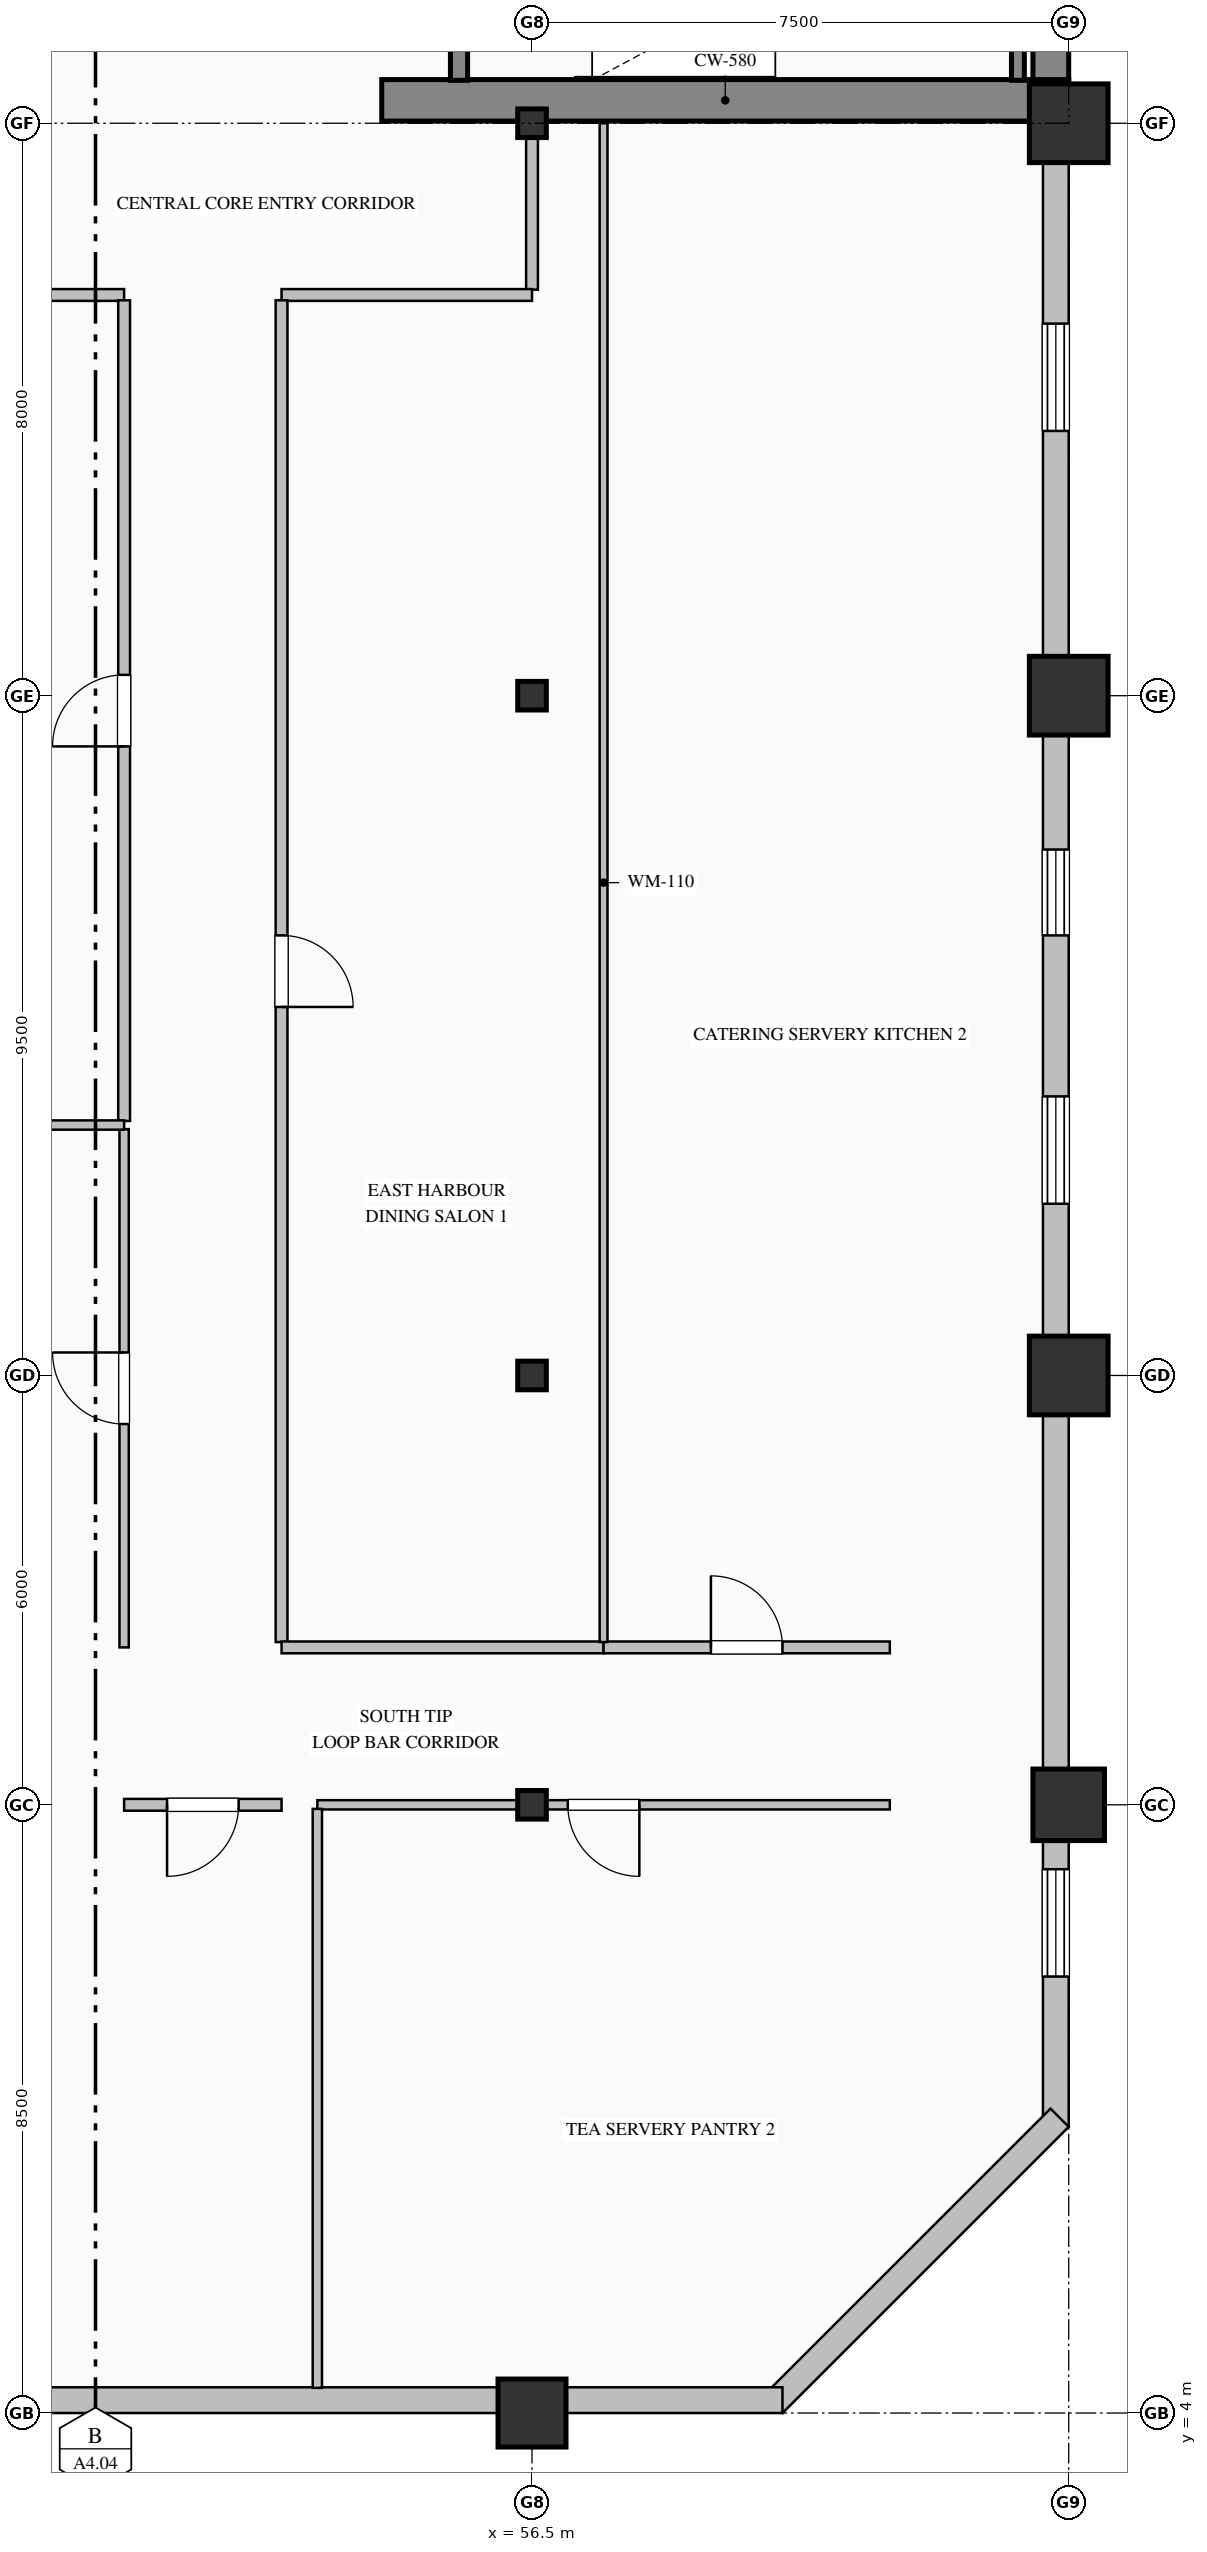
"""IFC4 building model, lengths in metres.
Left out: names, types, materials, properties, quantities, classifications, styles, units other than length and angle.
Written with IfcOpenShell. Run it as: python <this file> out.ifc"""

import sys

from ifc_helpers import new_model, si_unit, direction, frame, frame_2d, origin, origin_2d, place, context, subcontext, project, spatial, rectangle, hollow_rectangle, hollow_circle, i_section, extrude, element, fill, save


model = new_model("IFC4")
c1 = context("Model", 3, precision=1e-05, world=origin(), true_north=direction((0.0, 1.0)))
c2 = subcontext(c1, "Body", "Model", "MODEL_VIEW")
j1 = project(units=[si_unit("LENGTHUNIT", "METRE"), si_unit("PLANEANGLEUNIT", "RADIAN")], contexts=[c1])
p1 = place(None, origin())
s1 = spatial("IfcSite", under=j1, at=p1, CompositionType="ELEMENT")
p2 = place(p1, origin())
s2 = spatial("IfcBuilding", under=s1, at=p2, CompositionType="ELEMENT")
p3 = place(p2, frame((0.0, 0.0, 163.0)))
s3 = spatial("IfcBuildingStorey", under=s2, at=p3, CompositionType="ELEMENT", Elevation=163.0)
p4 = place(p3, frame((63.75, 36.32, 0.0), z_axis=(0.0, 0.0, 1.0), x_axis=(0.0, 1.0, 0.0)))
e1 = element("IfcWall", 1, at=p4, inside=s3, PredefinedType="SHEAR", context=c2, shape_type="SweptSolid", body=[
    extrude(rectangle(XDim=15.18, YDim=0.5, at=frame_2d((7.59, 0.0))), origin(), (0.0, 0.0, 1.0), 3.765),
])
p5 = place(p3, frame((54.4, 36.32, 0.0), z_axis=(0.0, 0.0, 1.0), x_axis=(1.0, 0.0, 0.0)))
e2 = element("IfcWall", 2, at=p5, inside=s3, PredefinedType="SHEAR", context=c2, shape_type="SweptSolid", body=[
    extrude(rectangle(XDim=9.6, YDim=0.58, at=frame_2d((4.8, 0.0))), origin(), (0.0, 0.0, 1.0), 4.0),
])
p6 = place(p3, frame((56.5, 4.0, 0.0), z_axis=(0.0, 0.0, 1.0), x_axis=(1.0, 0.0, 0.0)))
e3 = element("IfcColumn", 3, at=p6, inside=s3, PredefinedType="COLUMN", context=c2, shape_type="SweptSolid", body=[
    extrude(hollow_rectangle(XDim=0.95, YDim=0.95, WallThickness=0.036, at=origin_2d()), origin(), (0.0, 0.0, 1.0), 4.0),
])
for number, where, z_axis, x_axis in (
    (4, (56.5, 12.5, 0.0), (0.0, 0.0, 1.0), (1.0, 0.0, 0.0)),
    (5, (56.5, 18.5, 0.0), (0.0, 0.0, 1.0), (1.0, 0.0, 0.0)),
    (6, (56.5, 28.0, 0.0), (0.0, 0.0, 1.0), (1.0, 0.0, 0.0)),
    (7, (56.5, 36.0, 0.0), (0.0, 0.0, 1.0), (1.0, 0.0, 0.0)),
):
    element("IfcColumn", number, at=place(p3, frame(where, z_axis=z_axis, x_axis=x_axis)), inside=s3, PredefinedType="COLUMN", context=c2, shape_type="SweptSolid", body=[
        extrude(i_section(OverallWidth=0.4, OverallDepth=0.4, WebThickness=0.013, FlangeThickness=0.021, FilletRadius=0.022, at=origin_2d()), origin(), (0.0, 0.0, 1.0), 4.0),
    ])
p7 = place(p3, frame((64.0, 12.5, 0.0), z_axis=(0.0, 0.0, 1.0), x_axis=(1.0, 0.0, 0.0)))
e8 = element("IfcColumn", 8, at=p7, inside=s3, PredefinedType="COLUMN", context=c2, shape_type="SweptSolid", body=[
    extrude(hollow_circle(Radius=0.5, WallThickness=0.036, at=origin_2d()), origin(), (0.0, 0.0, 1.0), 4.0),
])
for number, where, z_axis, x_axis in (
    (9, (64.0, 18.5, 0.0), (0.0, 0.0, 1.0), (1.0, 0.0, 0.0)),
    (10, (64.0, 28.0, 0.0), (0.0, 0.0, 1.0), (1.0, 0.0, 0.0)),
    (11, (64.0, 36.0, 0.0), (0.0, 0.0, 1.0), (1.0, 0.0, 0.0)),
):
    element("IfcColumn", number, at=place(p3, frame(where, z_axis=z_axis, x_axis=x_axis)), inside=s3, PredefinedType="COLUMN", context=c2, shape_type="SweptSolid", body=[
        extrude(hollow_rectangle(XDim=1.1, YDim=1.1, WallThickness=0.04, at=origin_2d()), origin(), (0.0, 0.0, 1.0), 4.0),
    ])
p8 = place(p3, frame((63.82, 36.05, 0.0), z_axis=(0.0, 0.0, 1.0), x_axis=(0.0, -1.0, 0.0)))
e12 = element("IfcWall", 12, at=p8, inside=s3, PredefinedType="SOLIDWALL", context=c2, shape_type="SweptSolid", body=[
    extrude(rectangle(XDim=28.05, YDim=0.36, at=frame_2d((14.025, 0.0))), origin(), (0.0, 0.0, 1.0), 3.265),
])
p9 = place(p8, frame((2.85, 0.0, 0.85)))
e13 = element("IfcOpeningElement", 13, at=p9, cuts=e12, PredefinedType="OPENING", context=c2, shape_type="SweptSolid", body=[
    extrude(rectangle(XDim=1.5, YDim=1.95, at=frame_2d((0.75, 0.975))), frame((0.0, 0.19, 0.0), z_axis=(0.0, -1.0, 0.0), x_axis=(1.0, 0.0, 0.0)), (0.0, 0.0, 1.0), 0.38),
])
p10 = place(p8, frame((10.2, 0.0, 0.7)))
e14 = element("IfcOpeningElement", 14, at=p10, cuts=e12, PredefinedType="OPENING", context=c2, shape_type="SweptSolid", body=[
    extrude(rectangle(XDim=1.2, YDim=1.85, at=frame_2d((0.6, 0.925))), frame((0.0, 0.19, 0.0), z_axis=(0.0, -1.0, 0.0), x_axis=(1.0, 0.0, 0.0)), (0.0, 0.0, 1.0), 0.38),
])
p11 = place(p8, frame((13.65, 0.0, 0.85)))
e15 = element("IfcOpeningElement", 15, at=p11, cuts=e12, PredefinedType="OPENING", context=c2, shape_type="SweptSolid", body=[
    extrude(rectangle(XDim=1.5, YDim=1.95, at=frame_2d((0.75, 0.975))), frame((0.0, 0.19, 0.0), z_axis=(0.0, -1.0, 0.0), x_axis=(1.0, 0.0, 0.0)), (0.0, 0.0, 1.0), 0.38),
])
p12 = place(p8, frame((24.45, 0.0, 0.85)))
e16 = element("IfcOpeningElement", 16, at=p12, cuts=e12, PredefinedType="OPENING", context=c2, shape_type="SweptSolid", body=[
    extrude(rectangle(XDim=1.5, YDim=1.95, at=frame_2d((0.75, 0.975))), frame((0.0, 0.19, 0.0), z_axis=(0.0, -1.0, 0.0), x_axis=(1.0, 0.0, 0.0)), (0.0, 0.0, 1.0), 0.38),
])
p13 = place(p3, frame((63.873, 8.127, 0.0), z_axis=(0.0, 0.0, 1.0), x_axis=(-0.707106781187, -0.707106781187, 0.0)))
e17 = element("IfcWall", 17, at=p13, inside=s3, PredefinedType="SOLIDWALL", context=c2, shape_type="SweptSolid", body=[
    extrude(rectangle(XDim=5.657, YDim=0.36, at=frame_2d((2.828, 0.0))), origin(), (0.0, 0.0, 1.0), 3.765),
])
p14 = place(p3, frame((60.0, 4.18, 0.0), z_axis=(0.0, 0.0, 1.0), x_axis=(-1.0, 0.0, 0.0)))
e18 = element("IfcWall", 18, at=p14, inside=s3, PredefinedType="SOLIDWALL", context=c2, shape_type="SweptSolid", body=[
    extrude(rectangle(XDim=15.5, YDim=0.36, at=frame_2d((7.75, 0.0))), origin(), (0.0, 0.0, 1.0), 3.265),
])
p15 = place(p3, frame((55.48, 39.75, 0.0), z_axis=(0.0, 0.0, 1.0), x_axis=(0.0, -1.0, 0.0)))
e19 = element("IfcWall", 19, at=p15, inside=s3, PredefinedType="SOLIDWALL", context=c2, shape_type="SweptSolid", body=[
    extrude(rectangle(XDim=3.15, YDim=0.24, at=frame_2d((1.575, 0.0))), origin(), (0.0, 0.0, 1.0), 4.0),
])
p16 = place(p15, frame((1.0, 0.0, 0.0)))
e20 = element("IfcOpeningElement", 20, at=p16, cuts=e19, PredefinedType="OPENING", context=c2, shape_type="SweptSolid", body=[
    extrude(rectangle(XDim=1.15, YDim=2.2, at=frame_2d((0.575, 1.1))), frame((0.0, 0.13, 0.0), z_axis=(0.0, -1.0, 0.0), x_axis=(1.0, 0.0, 0.0)), (0.0, 0.0, 1.0), 0.26),
])
p17 = place(p3, frame((63.29, 36.6, 0.0), z_axis=(0.0, 0.0, 1.0), x_axis=(0.0, 1.0, 0.0)))
e21 = element("IfcWall", 21, at=p17, inside=s3, PredefinedType="SOLIDWALL", context=c2, shape_type="SweptSolid", body=[
    extrude(rectangle(XDim=3.15, YDim=0.18, at=frame_2d((1.575, 0.0))), origin(), (0.0, 0.0, 1.0), 4.0),
])
p18 = place(p3, frame((56.5, 36.0, 0.0), z_axis=(0.0, 0.0, 1.0), x_axis=(0.0, -1.0, 0.0)))
e22 = element("IfcWall", 22, at=p18, inside=s3, PredefinedType="PARTITIONING", context=c2, shape_type="SweptSolid", body=[
    extrude(rectangle(XDim=2.325, YDim=0.165, at=frame_2d((1.163, 0.0))), origin(), (0.0, 0.0, 1.0), 3.157),
])
p19 = place(p3, frame((56.5, 33.6, 0.0), z_axis=(0.0, 0.0, 1.0), x_axis=(-1.0, 0.0, 0.0)))
e23 = element("IfcWall", 23, at=p19, inside=s3, PredefinedType="PARTITIONING", context=c2, shape_type="SweptSolid", body=[
    extrude(rectangle(XDim=3.5, YDim=0.165, at=frame_2d((1.75, 0.0))), origin(), (0.0, 0.0, 1.0), 3.765),
])
p20 = place(p3, frame((50.8, 33.6, 0.0), z_axis=(0.0, 0.0, 1.0), x_axis=(-1.0, 0.0, 0.0)))
e24 = element("IfcWall", 24, at=p20, inside=s3, PredefinedType="PARTITIONING", context=c2, shape_type="SweptSolid", body=[
    extrude(rectangle(XDim=10.3, YDim=0.165, at=frame_2d((5.15, 0.0))), origin(), (0.0, 0.0, 1.0), 3.765),
])
p21 = place(p3, frame((53.0, 33.525, 0.0), z_axis=(0.0, 0.0, 1.0), x_axis=(0.0, -1.0, 0.0)))
e25 = element("IfcWall", 25, at=p21, inside=s3, PredefinedType="PARTITIONING", context=c2, shape_type="SweptSolid", body=[
    extrude(rectangle(XDim=18.751, YDim=0.165, at=frame_2d((9.375, 0.0))), origin(), (0.0, 0.0, 1.0), 3.765),
])
p22 = place(p21, frame((8.875, 0.0, 0.0)))
e26 = element("IfcOpeningElement", 26, at=p22, cuts=e25, PredefinedType="OPENING", context=c2, shape_type="SweptSolid", body=[
    extrude(rectangle(XDim=1.0, YDim=2.15, at=frame_2d((0.5, 1.075))), frame((0.0, 0.093, 0.0), z_axis=(0.0, -1.0, 0.0), x_axis=(1.0, 0.0, 0.0)), (0.0, 0.0, 1.0), 0.185),
])
p23 = place(p3, frame((50.8, 14.7, 0.0), z_axis=(0.0, 0.0, 1.0), x_axis=(0.0, 1.0, 0.0)))
e27 = element("IfcWall", 27, at=p23, inside=s3, PredefinedType="PARTITIONING", context=c2, shape_type="SweptSolid", body=[
    extrude(rectangle(XDim=7.243, YDim=0.13, at=frame_2d((3.622, 0.0))), origin(), (0.0, 0.0, 1.0), 3.765),
])
p24 = place(p23, frame((3.122, 0.0, 0.0)))
e28 = element("IfcOpeningElement", 28, at=p24, cuts=e27, PredefinedType="OPENING", context=c2, shape_type="SweptSolid", body=[
    extrude(rectangle(XDim=1.0, YDim=2.15, at=frame_2d((0.5, 1.075))), frame((0.0, 0.075, 0.0), z_axis=(0.0, -1.0, 0.0), x_axis=(1.0, 0.0, 0.0)), (0.0, 0.0, 1.0), 0.15),
])
p25 = place(p3, frame((50.8, 22.057, 0.0), z_axis=(0.0, 0.0, 1.0), x_axis=(0.0, 1.0, 0.0)))
e29 = element("IfcWall", 29, at=p25, inside=s3, PredefinedType="PARTITIONING", context=c2, shape_type="SweptSolid", body=[
    extrude(rectangle(XDim=11.469, YDim=0.165, at=frame_2d((5.734, 0.0))), origin(), (0.0, 0.0, 1.0), 3.765),
])
p26 = place(p25, frame((5.234, 0.0, 0.0)))
e30 = element("IfcOpeningElement", 30, at=p26, cuts=e29, PredefinedType="OPENING", context=c2, shape_type="SweptSolid", body=[
    extrude(rectangle(XDim=1.0, YDim=2.15, at=frame_2d((0.5, 1.075))), frame((0.0, 0.093, 0.0), z_axis=(0.0, -1.0, 0.0), x_axis=(1.0, 0.0, 0.0)), (0.0, 0.0, 1.0), 0.185),
])
p27 = place(p3, frame((53.0, 12.5, 0.0), z_axis=(0.0, 0.0, 1.0), x_axis=(-1.0, 0.0, 0.0)))
e31 = element("IfcWall", 31, at=p27, inside=s3, PredefinedType="PARTITIONING", context=c2, shape_type="SweptSolid", body=[
    extrude(rectangle(XDim=2.2, YDim=0.165, at=frame_2d((1.1, 0.0))), origin(), (0.0, 0.0, 1.0), 3.157),
])
p28 = place(p27, frame((0.6, 0.0, 0.0)))
e32 = element("IfcOpeningElement", 32, at=p28, cuts=e31, PredefinedType="OPENING", context=c2, shape_type="SweptSolid", body=[
    extrude(rectangle(XDim=1.0, YDim=2.15, at=frame_2d((0.5, 1.075))), frame((0.0, 0.093, 0.0), z_axis=(0.0, -1.0, 0.0), x_axis=(1.0, 0.0, 0.0)), (0.0, 0.0, 1.0), 0.185),
])
p29 = place(p3, frame((53.0, 14.7, 0.0), z_axis=(0.0, 0.0, 1.0), x_axis=(1.0, 0.0, 0.0)))
e33 = element("IfcWall", 33, at=p29, inside=s3, PredefinedType="PARTITIONING", context=c2, shape_type="SweptSolid", body=[
    extrude(rectangle(XDim=4.5, YDim=0.165, at=frame_2d((2.25, 0.0))), origin(), (0.0, 0.0, 1.0), 3.765),
])
p30 = place(p3, frame((57.5, 14.7, 0.0), z_axis=(0.0, 0.0, 1.0), x_axis=(1.0, 0.0, 0.0)))
e34 = element("IfcWall", 34, at=p30, inside=s3, PredefinedType="PARTITIONING", context=c2, shape_type="SweptSolid", body=[
    extrude(rectangle(XDim=4.0, YDim=0.165, at=frame_2d((2.0, 0.0))), origin(), (0.0, 0.0, 1.0), 3.765),
])
p31 = place(p30, frame((1.5, 0.0, 0.0)))
e35 = element("IfcOpeningElement", 35, at=p31, cuts=e34, PredefinedType="OPENING", context=c2, shape_type="SweptSolid", body=[
    extrude(rectangle(XDim=1.0, YDim=2.15, at=frame_2d((0.5, 1.075))), frame((0.0, 0.093, 0.0), z_axis=(0.0, -1.0, 0.0), x_axis=(1.0, 0.0, 0.0)), (0.0, 0.0, 1.0), 0.185),
])
p32 = place(p3, frame((61.5, 12.5, 0.0), z_axis=(0.0, 0.0, 1.0), x_axis=(-1.0, 0.0, 0.0)))
e36 = element("IfcWall", 36, at=p32, inside=s3, PredefinedType="PARTITIONING", context=c2, shape_type="SweptSolid", body=[
    extrude(rectangle(XDim=8.0, YDim=0.13, at=frame_2d((4.0, 0.0))), origin(), (0.0, 0.0, 1.0), 3.157),
])
p33 = place(p32, frame((3.5, 0.0, 0.0)))
e37 = element("IfcOpeningElement", 37, at=p33, cuts=e36, PredefinedType="OPENING", context=c2, shape_type="SweptSolid", body=[
    extrude(rectangle(XDim=1.0, YDim=2.15, at=frame_2d((0.5, 1.075))), frame((0.0, 0.075, 0.0), z_axis=(0.0, -1.0, 0.0), x_axis=(1.0, 0.0, 0.0)), (0.0, 0.0, 1.0), 0.15),
])
p34 = place(p3, frame((57.5, 36.0, 0.0), z_axis=(0.0, 0.0, 1.0), x_axis=(0.0, -1.0, 0.0)))
e38 = element("IfcWall", 38, at=p34, inside=s3, PredefinedType="MOVABLE", context=c2, shape_type="SweptSolid", body=[
    extrude(rectangle(XDim=21.226, YDim=0.11, at=frame_2d((10.613, 0.0))), origin(), (0.0, 0.0, 1.0), 3.765),
])
p35 = place(p3, frame((40.852, 22.0, 0.0), z_axis=(0.0, 0.0, 1.0), x_axis=(1.0, 0.0, 0.0)))
e39 = element("IfcWall", 39, at=p35, inside=s3, PredefinedType="PARTITIONING", context=c2, shape_type="SweptSolid", body=[
    extrude(rectangle(XDim=9.948, YDim=0.13, at=frame_2d((4.974, 0.0))), origin(), (0.0, 0.0, 1.0), 3.765),
])
p36 = place(p3, frame((53.5, 12.443, 0.0), z_axis=(0.0, 0.0, 1.0), x_axis=(0.0, -1.0, 0.0)))
e40 = element("IfcWall", 40, at=p36, inside=s3, PredefinedType="PARTITIONING", context=c2, shape_type="SweptSolid", body=[
    extrude(rectangle(XDim=8.091, YDim=0.13, at=frame_2d((4.045, 0.0))), origin(), (0.0, 0.0, 1.0), 3.765),
])
p37 = place(p9, origin())
e41 = element("IfcWindow", 41, at=p37, inside=s3, PartitioningType="DOUBLE_PANEL_VERTICAL", PredefinedType="WINDOW", context=c2, shape_type="SweptSolid", body=[
    extrude(rectangle(XDim=1.5, YDim=1.95, at=frame_2d((0.75, 0.975))), frame((0.0, 0.15, 0.0), z_axis=(0.0, -1.0, 0.0), x_axis=(1.0, 0.0, 0.0)), (0.0, 0.0, 1.0), 0.06),
])
fill(e13, e41)
p38 = place(p10, origin())
e42 = element("IfcWindow", 42, at=p38, inside=s3, PartitioningType="DOUBLE_PANEL_VERTICAL", PredefinedType="WINDOW", context=c2, shape_type="SweptSolid", body=[
    extrude(rectangle(XDim=1.2, YDim=1.85, at=frame_2d((0.6, 0.925))), frame((0.0, 0.15, 0.0), z_axis=(0.0, -1.0, 0.0), x_axis=(1.0, 0.0, 0.0)), (0.0, 0.0, 1.0), 0.06),
])
fill(e14, e42)
p39 = place(p11, origin())
e43 = element("IfcWindow", 43, at=p39, inside=s3, PartitioningType="DOUBLE_PANEL_VERTICAL", PredefinedType="WINDOW", context=c2, shape_type="SweptSolid", body=[
    extrude(rectangle(XDim=1.5, YDim=1.95, at=frame_2d((0.75, 0.975))), frame((0.0, 0.15, 0.0), z_axis=(0.0, -1.0, 0.0), x_axis=(1.0, 0.0, 0.0)), (0.0, 0.0, 1.0), 0.06),
])
fill(e15, e43)
p40 = place(p12, origin())
e44 = element("IfcWindow", 44, at=p40, inside=s3, PartitioningType="DOUBLE_PANEL_VERTICAL", PredefinedType="WINDOW", context=c2, shape_type="SweptSolid", body=[
    extrude(rectangle(XDim=1.5, YDim=1.95, at=frame_2d((0.75, 0.975))), frame((0.0, 0.15, 0.0), z_axis=(0.0, -1.0, 0.0), x_axis=(1.0, 0.0, 0.0)), (0.0, 0.0, 1.0), 0.06),
])
fill(e16, e44)
p41 = place(p22, origin())
e45 = element("IfcDoor", 45, at=p41, inside=s3, OperationType="SINGLE_SWING_RIGHT", PredefinedType="DOOR", context=c2, shape_type="SweptSolid", body=[
    extrude(rectangle(XDim=1.0, YDim=2.15, at=frame_2d((0.5, 1.075))), frame((0.0, 0.025, 0.0), z_axis=(0.0, -1.0, 0.0), x_axis=(1.0, 0.0, 0.0)), (0.0, 0.0, 1.0), 0.05),
])
fill(e26, e45)
p42 = place(p31, origin())
e46 = element("IfcDoor", 46, at=p42, inside=s3, OperationType="SINGLE_SWING_LEFT", PredefinedType="DOOR", context=c2, shape_type="SweptSolid", body=[
    extrude(rectangle(XDim=1.0, YDim=2.15, at=frame_2d((0.5, 1.075))), frame((0.0, 0.025, 0.0), z_axis=(0.0, -1.0, 0.0), x_axis=(1.0, 0.0, 0.0)), (0.0, 0.0, 1.0), 0.05),
])
fill(e35, e46)
p43 = place(p24, origin())
e47 = element("IfcDoor", 47, at=p43, inside=s3, OperationType="SINGLE_SWING_RIGHT", PredefinedType="DOOR", context=c2, shape_type="SweptSolid", body=[
    extrude(rectangle(XDim=1.0, YDim=2.15, at=frame_2d((0.5, 1.075))), frame((0.0, 0.025, 0.0), z_axis=(0.0, -1.0, 0.0), x_axis=(1.0, 0.0, 0.0)), (0.0, 0.0, 1.0), 0.05),
])
fill(e28, e47)
p44 = place(p26, origin())
e48 = element("IfcDoor", 48, at=p44, inside=s3, OperationType="SINGLE_SWING_LEFT", PredefinedType="DOOR", context=c2, shape_type="SweptSolid", body=[
    extrude(rectangle(XDim=1.0, YDim=2.15, at=frame_2d((0.5, 1.075))), frame((0.0, 0.025, 0.0), z_axis=(0.0, -1.0, 0.0), x_axis=(1.0, 0.0, 0.0)), (0.0, 0.0, 1.0), 0.05),
])
fill(e30, e48)
p45 = place(p28, origin())
e49 = element("IfcDoor", 49, at=p45, inside=s3, OperationType="SINGLE_SWING_RIGHT", PredefinedType="DOOR", context=c2, shape_type="SweptSolid", body=[
    extrude(rectangle(XDim=1.0, YDim=2.15, at=frame_2d((0.5, 1.075))), frame((0.0, 0.025, 0.0), z_axis=(0.0, -1.0, 0.0), x_axis=(1.0, 0.0, 0.0)), (0.0, 0.0, 1.0), 0.05),
])
fill(e32, e49)
p46 = place(p33, origin())
e50 = element("IfcDoor", 50, at=p46, inside=s3, OperationType="SINGLE_SWING_LEFT", PredefinedType="DOOR", context=c2, shape_type="SweptSolid", body=[
    extrude(rectangle(XDim=1.0, YDim=2.15, at=frame_2d((0.5, 1.075))), frame((0.0, 0.025, 0.0), z_axis=(0.0, -1.0, 0.0), x_axis=(1.0, 0.0, 0.0)), (0.0, 0.0, 1.0), 0.05),
])
fill(e37, e50)
save(model, sys.argv[1])
